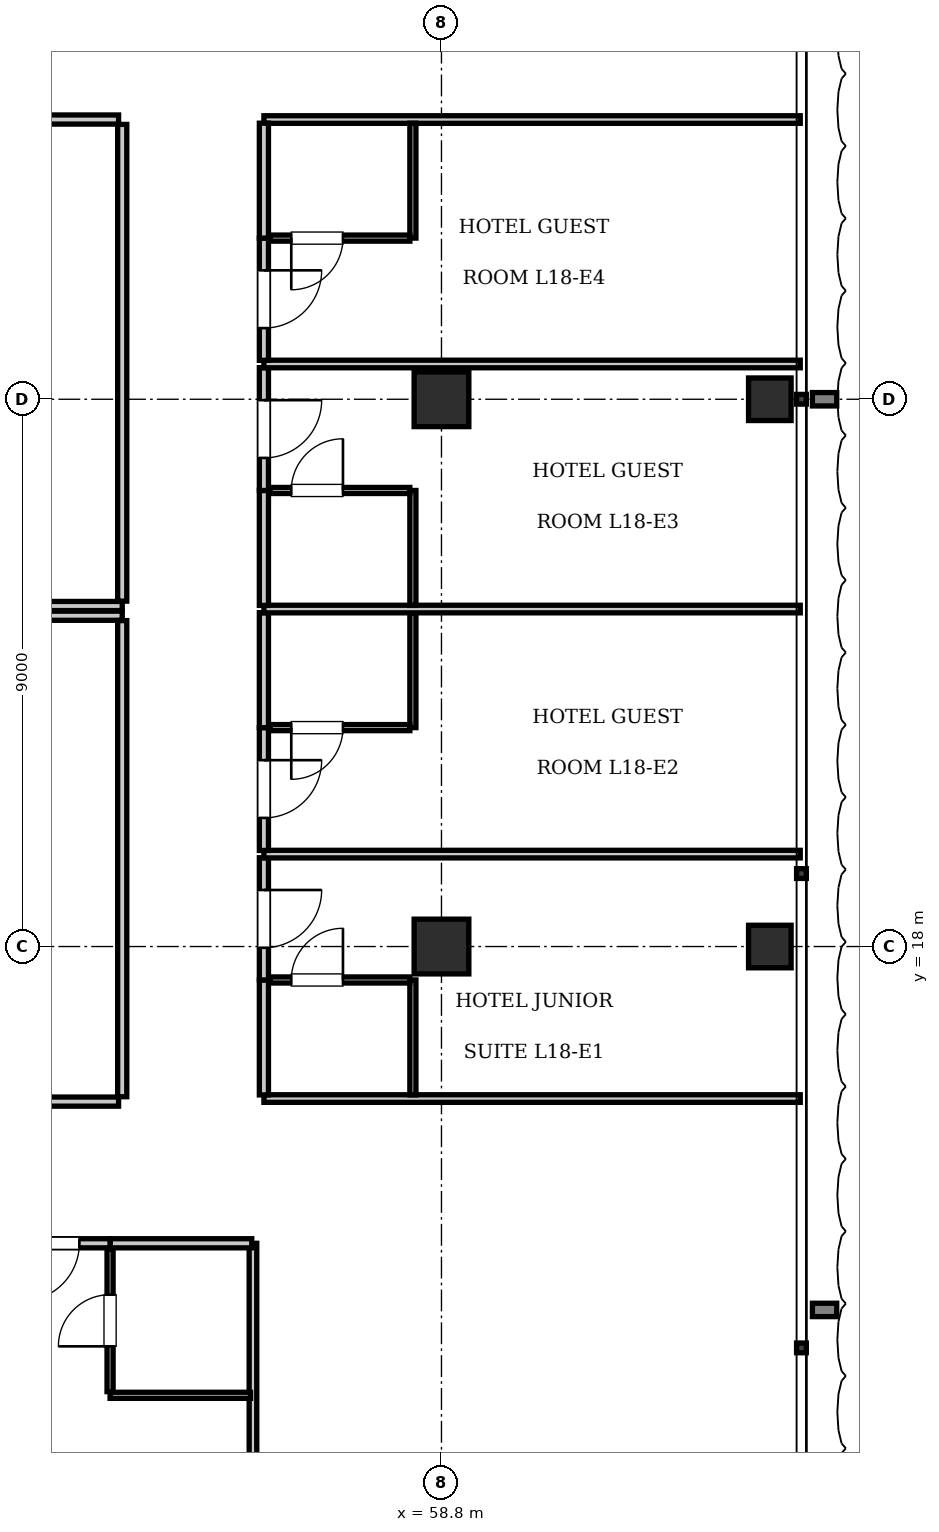
"""IFC4 building model, lengths in metres.
Left out: names, types, materials, properties, quantities, classifications, styles, units other than length and angle.
Written with IfcOpenShell. Run it as: python <this file> out.ifc"""

import sys

from ifc_helpers import new_model, si_unit, direction, frame, frame_2d, origin, origin_2d, place, context, subcontext, project, spatial, rectangle, i_section, extrude, element, fill, save


model = new_model("IFC4")
c1 = context("Model", 3, precision=1e-05, world=origin(), true_north=direction((0.0, 1.0)))
c2 = subcontext(c1, "Body", "Model", "MODEL_VIEW")
j1 = project(units=[si_unit("LENGTHUNIT", "METRE"), si_unit("PLANEANGLEUNIT", "RADIAN")], contexts=[c1])
p1 = place(None, origin())
s1 = spatial("IfcSite", under=j1, at=p1, CompositionType="ELEMENT")
p2 = place(p1, origin())
s2 = spatial("IfcBuilding", under=s1, at=p2, CompositionType="ELEMENT")
p3 = place(p2, frame((0.0, 0.0, 77.0)))
s3 = spatial("IfcBuildingStorey", under=s2, at=p3, CompositionType="ELEMENT", Elevation=77.0)
for number, where, z_axis, x_axis in (
    (1, (58.8, 18.0, 0.0), (0.0, 0.0, 1.0), (1.0, 0.0, 0.0)),
    (2, (58.8, 27.0, 0.0), (0.0, 0.0, 1.0), (1.0, 0.0, 0.0)),
):
    element("IfcColumn", number, at=place(p3, frame(where, z_axis=z_axis, x_axis=x_axis)), inside=s3, PredefinedType="COLUMN", context=c2, shape_type="SweptSolid", body=[
        extrude(rectangle(XDim=0.9, YDim=0.9, at=origin_2d()), origin(), (0.0, 0.0, 1.0), 3.85),
    ])
for number, where, z_axis, x_axis in (
    (3, (64.2, 18.0, 0.0), (0.0, 0.0, 1.0), (1.0, 0.0, 0.0)),
    (4, (64.2, 27.0, 0.0), (0.0, 0.0, 1.0), (1.0, 0.0, 0.0)),
):
    element("IfcColumn", number, at=place(p3, frame(where, z_axis=z_axis, x_axis=x_axis)), inside=s3, PredefinedType="COLUMN", context=c2, shape_type="SweptSolid", body=[
        extrude(i_section(OverallWidth=0.7, OverallDepth=0.7, WebThickness=0.028, FlangeThickness=0.044, at=origin_2d()), origin(), (0.0, 0.0, 1.0), 3.85),
    ])
p4 = place(p3, frame((22.05, 23.6, 0.0), z_axis=(0.0, 0.0, 1.0), x_axis=(1.0, 0.0, 0.0)))
e5 = element("IfcWall", 5, at=p4, inside=s3, PredefinedType="PARTITIONING", context=c2, shape_type="SweptSolid", body=[
    extrude(rectangle(XDim=31.5, YDim=0.15, at=frame_2d((15.75, 0.0))), origin(), (0.0, 0.0, 1.0), 3.61),
])
p5 = place(p3, frame((53.55, 23.68, 0.0), z_axis=(0.0, 0.0, 1.0), x_axis=(0.0, 1.0, 0.0)))
e6 = element("IfcWall", 6, at=p5, inside=s3, PredefinedType="PARTITIONING", context=c2, shape_type="SweptSolid", body=[
    extrude(rectangle(XDim=7.84, YDim=0.15, at=frame_2d((3.92, 0.0))), origin(), (0.0, 0.0, 1.0), 3.61),
])
p6 = place(p3, frame((42.87, 31.6, 0.0), z_axis=(0.0, 0.0, 1.0), x_axis=(1.0, 0.0, 0.0)))
e7 = element("IfcWall", 7, at=p6, inside=s3, PredefinedType="PARTITIONING", context=c2, shape_type="SweptSolid", body=[
    extrude(rectangle(XDim=10.62, YDim=0.15, at=frame_2d((5.31, 0.0))), origin(), (0.0, 0.0, 1.0), 3.61),
])
p7 = place(p6, frame((4.86, 0.0, 0.0)))
e8 = element("IfcOpeningElement", 8, at=p7, cuts=e7, PredefinedType="OPENING", context=c2, shape_type="SweptSolid", body=[
    extrude(rectangle(XDim=0.9, YDim=2.1, at=frame_2d((0.45, 1.05))), frame((0.0, 0.085, 0.0), z_axis=(0.0, -1.0, 0.0), x_axis=(1.0, 0.0, 0.0)), (0.0, 0.0, 1.0), 0.17),
])
p8 = place(p3, frame((22.05, 23.44, 0.0), z_axis=(0.0, 0.0, 1.0), x_axis=(1.0, 0.0, 0.0)))
e9 = element("IfcWall", 9, at=p8, inside=s3, PredefinedType="PARTITIONING", context=c2, shape_type="SweptSolid", body=[
    extrude(rectangle(XDim=31.5, YDim=0.15, at=frame_2d((15.75, 0.0))), origin(), (0.0, 0.0, 1.0), 3.61),
])
p9 = place(p3, frame((53.55, 15.53, 0.0), z_axis=(0.0, 0.0, 1.0), x_axis=(0.0, 1.0, 0.0)))
e10 = element("IfcWall", 10, at=p9, inside=s3, PredefinedType="PARTITIONING", context=c2, shape_type="SweptSolid", body=[
    extrude(rectangle(XDim=7.83, YDim=0.15, at=frame_2d((3.915, 0.0))), origin(), (0.0, 0.0, 1.0), 3.61),
])
p10 = place(p3, frame((40.035, 15.45, 0.0), z_axis=(0.0, 0.0, 1.0), x_axis=(1.0, 0.0, 0.0)))
e11 = element("IfcWall", 11, at=p10, inside=s3, PredefinedType="PARTITIONING", context=c2, shape_type="SweptSolid", body=[
    extrude(rectangle(XDim=13.455, YDim=0.15, at=frame_2d((6.728, 0.0))), origin(), (0.0, 0.0, 1.0), 3.61),
])
p11 = place(p10, frame((6.278, 0.0, 0.0)))
e12 = element("IfcOpeningElement", 12, at=p11, cuts=e11, PredefinedType="OPENING", context=c2, shape_type="SweptSolid", body=[
    extrude(rectangle(XDim=0.9, YDim=2.1, at=frame_2d((0.45, 1.05))), frame((0.0, 0.085, 0.0), z_axis=(0.0, -1.0, 0.0), x_axis=(1.0, 0.0, 0.0)), (0.0, 0.0, 1.0), 0.17),
])
p12 = place(p3, frame((55.7, 0.1, 0.0), z_axis=(0.0, 0.0, 1.0), x_axis=(0.0, 1.0, 0.0)))
e13 = element("IfcWall", 13, at=p12, inside=s3, PredefinedType="PARTITIONING", context=c2, shape_type="SweptSolid", body=[
    extrude(rectangle(XDim=13.02, YDim=0.125, at=frame_2d((6.51, 0.0))), origin(), (0.0, 0.0, 1.0), 3.61),
])
p13 = place(p3, frame((53.35, 13.12, 0.0), z_axis=(0.0, 0.0, 1.0), x_axis=(1.0, 0.0, 0.0)))
e14 = element("IfcWall", 14, at=p13, inside=s3, PredefinedType="PARTITIONING", context=c2, shape_type="SweptSolid", body=[
    extrude(rectangle(XDim=2.33, YDim=0.15, at=frame_2d((1.165, 0.0))), origin(), (0.0, 0.0, 1.0), 3.61),
])
p14 = place(p3, frame((53.35, 10.62, 0.0), z_axis=(0.0, 0.0, 1.0), x_axis=(1.0, 0.0, 0.0)))
e15 = element("IfcWall", 15, at=p14, inside=s3, PredefinedType="PARTITIONING", context=c2, shape_type="SweptSolid", body=[
    extrude(rectangle(XDim=2.31, YDim=0.1, at=frame_2d((1.155, 0.0))), origin(), (0.0, 0.0, 1.0), 3.61),
])
p15 = place(p3, frame((53.35, 10.68, 0.0), z_axis=(0.0, 0.0, 1.0), x_axis=(0.0, 1.0, 0.0)))
e16 = element("IfcWall", 16, at=p15, inside=s3, PredefinedType="PARTITIONING", context=c2, shape_type="SweptSolid", body=[
    extrude(rectangle(XDim=2.34, YDim=0.1, at=frame_2d((1.17, 0.0))), origin(), (0.0, 0.0, 1.0), 3.61),
])
p16 = place(p15, frame((0.745, 0.0, 0.0)))
e17 = element("IfcOpeningElement", 17, at=p16, cuts=e16, PredefinedType="OPENING", context=c2, shape_type="SweptSolid", body=[
    extrude(rectangle(XDim=0.85, YDim=2.1, at=frame_2d((0.425, 1.05))), frame((0.0, 0.06, 0.0), z_axis=(0.0, -1.0, 0.0), x_axis=(1.0, 0.0, 0.0)), (0.0, 0.0, 1.0), 0.12),
])
p17 = place(p3, frame((51.39, 13.12, 0.0), z_axis=(0.0, 0.0, 1.0), x_axis=(1.0, 0.0, 0.0)))
e18 = element("IfcWall", 18, at=p17, inside=s3, PredefinedType="PARTITIONING", context=c2, shape_type="SweptSolid", body=[
    extrude(rectangle(XDim=1.96, YDim=0.15, at=frame_2d((0.98, 0.0))), origin(), (0.0, 0.0, 1.0), 3.61),
])
p18 = place(p17, frame((0.505, 0.0, 0.0)))
e19 = element("IfcOpeningElement", 19, at=p18, cuts=e18, PredefinedType="OPENING", context=c2, shape_type="SweptSolid", body=[
    extrude(rectangle(XDim=0.95, YDim=2.15, at=frame_2d((0.475, 1.075))), frame((0.0, 0.085, 0.0), z_axis=(0.0, -1.0, 0.0), x_axis=(1.0, 0.0, 0.0)), (0.0, 0.0, 1.0), 0.17),
])
for number, where, z_axis, x_axis in (
    (20, (55.88, 15.5, 0.0), (0.0, 0.0, 1.0), (1.0, 0.0, 0.0)),
    (21, (55.88, 31.6, 0.0), (0.0, 0.0, 1.0), (1.0, 0.0, 0.0)),
):
    element("IfcWall", number, at=place(p3, frame(where, z_axis=z_axis, x_axis=x_axis)), inside=s3, PredefinedType="PARTITIONING", context=c2, shape_type="SweptSolid", body=[
        extrude(rectangle(XDim=8.82, YDim=0.125, at=frame_2d((4.41, 0.0))), origin(), (0.0, 0.0, 1.0), 3.61),
    ])
p19 = place(p3, frame((55.88, 15.56, 0.0), z_axis=(0.0, 0.0, 1.0), x_axis=(0.0, 1.0, 0.0)))
e22 = element("IfcWall", 22, at=p19, inside=s3, PredefinedType="PARTITIONING", context=c2, shape_type="SweptSolid", body=[
    extrude(rectangle(XDim=1.89, YDim=0.15, at=frame_2d((0.945, 0.0))), origin(), (0.0, 0.0, 1.0), 3.61),
])
p20 = place(p3, frame((55.88, 17.45, 0.0), z_axis=(0.0, 0.0, 1.0), x_axis=(0.0, 1.0, 0.0)))
e23 = element("IfcWall", 23, at=p20, inside=s3, PredefinedType="PARTITIONING", context=c2, shape_type="SweptSolid", body=[
    extrude(rectangle(XDim=2.01, YDim=0.15, at=frame_2d((1.005, 0.0))), origin(), (0.0, 0.0, 1.0), 3.61),
])
p21 = place(p20, frame((0.53, 0.0, 0.0)))
e24 = element("IfcOpeningElement", 24, at=p21, cuts=e23, PredefinedType="OPENING", context=c2, shape_type="SweptSolid", body=[
    extrude(rectangle(XDim=0.95, YDim=2.15, at=frame_2d((0.475, 1.075))), frame((0.0, 0.085, 0.0), z_axis=(0.0, -1.0, 0.0), x_axis=(1.0, 0.0, 0.0)), (0.0, 0.0, 1.0), 0.17),
])
p22 = place(p3, frame((58.33, 15.56, 0.0), z_axis=(0.0, 0.0, 1.0), x_axis=(0.0, 1.0, 0.0)))
e25 = element("IfcWall", 25, at=p22, inside=s3, PredefinedType="PARTITIONING", context=c2, shape_type="SweptSolid", body=[
    extrude(rectangle(XDim=1.89, YDim=0.1, at=frame_2d((0.945, 0.0))), origin(), (0.0, 0.0, 1.0), 3.61),
])
p23 = place(p3, frame((55.98, 17.45, 0.0), z_axis=(0.0, 0.0, 1.0), x_axis=(1.0, 0.0, 0.0)))
e26 = element("IfcWall", 26, at=p23, inside=s3, PredefinedType="PARTITIONING", context=c2, shape_type="SweptSolid", body=[
    extrude(rectangle(XDim=2.3, YDim=0.1, at=frame_2d((1.15, 0.0))), origin(), (0.0, 0.0, 1.0), 3.61),
])
p24 = place(p23, frame((0.35, 0.0, 0.0)))
e27 = element("IfcOpeningElement", 27, at=p24, cuts=e26, PredefinedType="OPENING", context=c2, shape_type="SweptSolid", body=[
    extrude(rectangle(XDim=0.85, YDim=2.1, at=frame_2d((0.425, 1.05))), frame((0.0, 0.06, 0.0), z_axis=(0.0, -1.0, 0.0), x_axis=(1.0, 0.0, 0.0)), (0.0, 0.0, 1.0), 0.12),
])
p25 = place(p3, frame((55.88, 19.52, 0.0), z_axis=(0.0, 0.0, 1.0), x_axis=(1.0, 0.0, 0.0)))
e28 = element("IfcWall", 28, at=p25, inside=s3, PredefinedType="PARTITIONING", context=c2, shape_type="SweptSolid", body=[
    extrude(rectangle(XDim=8.82, YDim=0.125, at=frame_2d((4.41, 0.0))), origin(), (0.0, 0.0, 1.0), 3.61),
])
p26 = place(p3, frame((55.88, 19.58, 0.0), z_axis=(0.0, 0.0, 1.0), x_axis=(0.0, 1.0, 0.0)))
e29 = element("IfcWall", 29, at=p26, inside=s3, PredefinedType="PARTITIONING", context=c2, shape_type="SweptSolid", body=[
    extrude(rectangle(XDim=2.02, YDim=0.15, at=frame_2d((1.01, 0.0))), origin(), (0.0, 0.0, 1.0), 3.61),
])
p27 = place(p26, frame((0.535, 0.0, 0.0)))
e30 = element("IfcOpeningElement", 30, at=p27, cuts=e29, PredefinedType="OPENING", context=c2, shape_type="SweptSolid", body=[
    extrude(rectangle(XDim=0.95, YDim=2.15, at=frame_2d((0.475, 1.075))), frame((0.0, 0.085, 0.0), z_axis=(0.0, -1.0, 0.0), x_axis=(1.0, 0.0, 0.0)), (0.0, 0.0, 1.0), 0.17),
])
p28 = place(p3, frame((55.88, 21.6, 0.0), z_axis=(0.0, 0.0, 1.0), x_axis=(0.0, 1.0, 0.0)))
e31 = element("IfcWall", 31, at=p28, inside=s3, PredefinedType="PARTITIONING", context=c2, shape_type="SweptSolid", body=[
    extrude(rectangle(XDim=1.89, YDim=0.15, at=frame_2d((0.945, 0.0))), origin(), (0.0, 0.0, 1.0), 3.61),
])
p29 = place(p3, frame((58.33, 21.6, 0.0), z_axis=(0.0, 0.0, 1.0), x_axis=(0.0, 1.0, 0.0)))
e32 = element("IfcWall", 32, at=p29, inside=s3, PredefinedType="PARTITIONING", context=c2, shape_type="SweptSolid", body=[
    extrude(rectangle(XDim=1.89, YDim=0.1, at=frame_2d((0.945, 0.0))), origin(), (0.0, 0.0, 1.0), 3.61),
])
p30 = place(p3, frame((55.98, 21.6, 0.0), z_axis=(0.0, 0.0, 1.0), x_axis=(1.0, 0.0, 0.0)))
e33 = element("IfcWall", 33, at=p30, inside=s3, PredefinedType="PARTITIONING", context=c2, shape_type="SweptSolid", body=[
    extrude(rectangle(XDim=2.3, YDim=0.1, at=frame_2d((1.15, 0.0))), origin(), (0.0, 0.0, 1.0), 3.61),
])
p31 = place(p30, frame((0.35, 0.0, 0.0)))
e34 = element("IfcOpeningElement", 34, at=p31, cuts=e33, PredefinedType="OPENING", context=c2, shape_type="SweptSolid", body=[
    extrude(rectangle(XDim=0.85, YDim=2.1, at=frame_2d((0.425, 1.05))), frame((0.0, 0.06, 0.0), z_axis=(0.0, -1.0, 0.0), x_axis=(1.0, 0.0, 0.0)), (0.0, 0.0, 1.0), 0.12),
])
p32 = place(p3, frame((55.88, 23.55, 0.0), z_axis=(0.0, 0.0, 1.0), x_axis=(1.0, 0.0, 0.0)))
e35 = element("IfcWall", 35, at=p32, inside=s3, PredefinedType="PARTITIONING", context=c2, shape_type="SweptSolid", body=[
    extrude(rectangle(XDim=8.82, YDim=0.125, at=frame_2d((4.41, 0.0))), origin(), (0.0, 0.0, 1.0), 3.61),
])
p33 = place(p3, frame((55.88, 23.61, 0.0), z_axis=(0.0, 0.0, 1.0), x_axis=(0.0, 1.0, 0.0)))
e36 = element("IfcWall", 36, at=p33, inside=s3, PredefinedType="PARTITIONING", context=c2, shape_type="SweptSolid", body=[
    extrude(rectangle(XDim=1.89, YDim=0.15, at=frame_2d((0.945, 0.0))), origin(), (0.0, 0.0, 1.0), 3.61),
])
p34 = place(p3, frame((55.88, 25.5, 0.0), z_axis=(0.0, 0.0, 1.0), x_axis=(0.0, 1.0, 0.0)))
e37 = element("IfcWall", 37, at=p34, inside=s3, PredefinedType="PARTITIONING", context=c2, shape_type="SweptSolid", body=[
    extrude(rectangle(XDim=2.02, YDim=0.15, at=frame_2d((1.01, 0.0))), origin(), (0.0, 0.0, 1.0), 3.61),
])
p35 = place(p34, frame((0.535, 0.0, 0.0)))
e38 = element("IfcOpeningElement", 38, at=p35, cuts=e37, PredefinedType="OPENING", context=c2, shape_type="SweptSolid", body=[
    extrude(rectangle(XDim=0.95, YDim=2.15, at=frame_2d((0.475, 1.075))), frame((0.0, 0.085, 0.0), z_axis=(0.0, -1.0, 0.0), x_axis=(1.0, 0.0, 0.0)), (0.0, 0.0, 1.0), 0.17),
])
p36 = place(p3, frame((58.33, 23.61, 0.0), z_axis=(0.0, 0.0, 1.0), x_axis=(0.0, 1.0, 0.0)))
e39 = element("IfcWall", 39, at=p36, inside=s3, PredefinedType="PARTITIONING", context=c2, shape_type="SweptSolid", body=[
    extrude(rectangle(XDim=1.89, YDim=0.1, at=frame_2d((0.945, 0.0))), origin(), (0.0, 0.0, 1.0), 3.61),
])
p37 = place(p3, frame((55.98, 25.5, 0.0), z_axis=(0.0, 0.0, 1.0), x_axis=(1.0, 0.0, 0.0)))
e40 = element("IfcWall", 40, at=p37, inside=s3, PredefinedType="PARTITIONING", context=c2, shape_type="SweptSolid", body=[
    extrude(rectangle(XDim=2.3, YDim=0.1, at=frame_2d((1.15, 0.0))), origin(), (0.0, 0.0, 1.0), 3.61),
])
p38 = place(p37, frame((0.35, 0.0, 0.0)))
e41 = element("IfcOpeningElement", 41, at=p38, cuts=e40, PredefinedType="OPENING", context=c2, shape_type="SweptSolid", body=[
    extrude(rectangle(XDim=0.85, YDim=2.1, at=frame_2d((0.425, 1.05))), frame((0.0, 0.06, 0.0), z_axis=(0.0, -1.0, 0.0), x_axis=(1.0, 0.0, 0.0)), (0.0, 0.0, 1.0), 0.12),
])
p39 = place(p3, frame((55.88, 27.58, 0.0), z_axis=(0.0, 0.0, 1.0), x_axis=(1.0, 0.0, 0.0)))
e42 = element("IfcWall", 42, at=p39, inside=s3, PredefinedType="PARTITIONING", context=c2, shape_type="SweptSolid", body=[
    extrude(rectangle(XDim=8.82, YDim=0.125, at=frame_2d((4.41, 0.0))), origin(), (0.0, 0.0, 1.0), 3.61),
])
p40 = place(p3, frame((55.88, 27.64, 0.0), z_axis=(0.0, 0.0, 1.0), x_axis=(0.0, 1.0, 0.0)))
e43 = element("IfcWall", 43, at=p40, inside=s3, PredefinedType="PARTITIONING", context=c2, shape_type="SweptSolid", body=[
    extrude(rectangle(XDim=2.01, YDim=0.15, at=frame_2d((1.005, 0.0))), origin(), (0.0, 0.0, 1.0), 3.61),
])
p41 = place(p40, frame((0.53, 0.0, 0.0)))
e44 = element("IfcOpeningElement", 44, at=p41, cuts=e43, PredefinedType="OPENING", context=c2, shape_type="SweptSolid", body=[
    extrude(rectangle(XDim=0.95, YDim=2.15, at=frame_2d((0.475, 1.075))), frame((0.0, 0.085, 0.0), z_axis=(0.0, -1.0, 0.0), x_axis=(1.0, 0.0, 0.0)), (0.0, 0.0, 1.0), 0.17),
])
p42 = place(p3, frame((55.88, 29.65, 0.0), z_axis=(0.0, 0.0, 1.0), x_axis=(0.0, 1.0, 0.0)))
e45 = element("IfcWall", 45, at=p42, inside=s3, PredefinedType="PARTITIONING", context=c2, shape_type="SweptSolid", body=[
    extrude(rectangle(XDim=1.89, YDim=0.15, at=frame_2d((0.945, 0.0))), origin(), (0.0, 0.0, 1.0), 3.61),
])
p43 = place(p3, frame((58.33, 29.65, 0.0), z_axis=(0.0, 0.0, 1.0), x_axis=(0.0, 1.0, 0.0)))
e46 = element("IfcWall", 46, at=p43, inside=s3, PredefinedType="PARTITIONING", context=c2, shape_type="SweptSolid", body=[
    extrude(rectangle(XDim=1.89, YDim=0.1, at=frame_2d((0.945, 0.0))), origin(), (0.0, 0.0, 1.0), 3.61),
])
p44 = place(p3, frame((55.98, 29.65, 0.0), z_axis=(0.0, 0.0, 1.0), x_axis=(1.0, 0.0, 0.0)))
e47 = element("IfcWall", 47, at=p44, inside=s3, PredefinedType="PARTITIONING", context=c2, shape_type="SweptSolid", body=[
    extrude(rectangle(XDim=2.3, YDim=0.1, at=frame_2d((1.15, 0.0))), origin(), (0.0, 0.0, 1.0), 3.61),
])
p45 = place(p44, frame((0.35, 0.0, 0.0)))
e48 = element("IfcOpeningElement", 48, at=p45, cuts=e47, PredefinedType="OPENING", context=c2, shape_type="SweptSolid", body=[
    extrude(rectangle(XDim=0.85, YDim=2.1, at=frame_2d((0.425, 1.05))), frame((0.0, 0.06, 0.0), z_axis=(0.0, -1.0, 0.0), x_axis=(1.0, 0.0, 0.0)), (0.0, 0.0, 1.0), 0.12),
])
p46 = place(p16, origin())
e49 = element("IfcDoor", 49, at=p46, inside=s3, OperationType="SINGLE_SWING_LEFT", PredefinedType="DOOR", context=c2, shape_type="SweptSolid", body=[
    extrude(rectangle(XDim=0.85, YDim=2.1, at=frame_2d((0.425, 1.05))), frame((0.0, 0.025, 0.0), z_axis=(0.0, -1.0, 0.0), x_axis=(1.0, 0.0, 0.0)), (0.0, 0.0, 1.0), 0.05),
])
fill(e17, e49)
p47 = place(p18, frame((0.95, 0.0, 0.0), z_axis=(0.0, 0.0, 1.0), x_axis=(-1.0, 0.0, 0.0)))
e50 = element("IfcDoor", 50, at=p47, inside=s3, OperationType="SINGLE_SWING_RIGHT", PredefinedType="DOOR", context=c2, shape_type="SweptSolid", body=[
    extrude(rectangle(XDim=0.95, YDim=2.15, at=frame_2d((0.475, 1.075))), frame((0.0, 0.025, 0.0), z_axis=(0.0, -1.0, 0.0), x_axis=(1.0, 0.0, 0.0)), (0.0, 0.0, 1.0), 0.05),
])
fill(e19, e50)
p48 = place(p24, origin())
e51 = element("IfcDoor", 51, at=p48, inside=s3, OperationType="SINGLE_SWING_RIGHT", PredefinedType="DOOR", context=c2, shape_type="SweptSolid", body=[
    extrude(rectangle(XDim=0.85, YDim=2.1, at=frame_2d((0.425, 1.05))), frame((0.0, 0.025, 0.0), z_axis=(0.0, -1.0, 0.0), x_axis=(1.0, 0.0, 0.0)), (0.0, 0.0, 1.0), 0.05),
])
fill(e27, e51)
p49 = place(p21, frame((0.95, 0.0, 0.0), z_axis=(0.0, 0.0, 1.0), x_axis=(-1.0, 0.0, 0.0)))
e52 = element("IfcDoor", 52, at=p49, inside=s3, OperationType="SINGLE_SWING_LEFT", PredefinedType="DOOR", context=c2, shape_type="SweptSolid", body=[
    extrude(rectangle(XDim=0.95, YDim=2.15, at=frame_2d((0.475, 1.075))), frame((0.0, 0.025, 0.0), z_axis=(0.0, -1.0, 0.0), x_axis=(1.0, 0.0, 0.0)), (0.0, 0.0, 1.0), 0.05),
])
fill(e24, e52)
p50 = place(p31, frame((0.85, 0.0, 0.0), z_axis=(0.0, 0.0, 1.0), x_axis=(-1.0, 0.0, 0.0)))
e53 = element("IfcDoor", 53, at=p50, inside=s3, OperationType="SINGLE_SWING_RIGHT", PredefinedType="DOOR", context=c2, shape_type="SweptSolid", body=[
    extrude(rectangle(XDim=0.85, YDim=2.1, at=frame_2d((0.425, 1.05))), frame((0.0, 0.025, 0.0), z_axis=(0.0, -1.0, 0.0), x_axis=(1.0, 0.0, 0.0)), (0.0, 0.0, 1.0), 0.05),
])
fill(e34, e53)
p51 = place(p27, frame((0.95, 0.0, 0.0), z_axis=(0.0, 0.0, 1.0), x_axis=(-1.0, 0.0, 0.0)))
e54 = element("IfcDoor", 54, at=p51, inside=s3, OperationType="SINGLE_SWING_LEFT", PredefinedType="DOOR", context=c2, shape_type="SweptSolid", body=[
    extrude(rectangle(XDim=0.95, YDim=2.15, at=frame_2d((0.475, 1.075))), frame((0.0, 0.025, 0.0), z_axis=(0.0, -1.0, 0.0), x_axis=(1.0, 0.0, 0.0)), (0.0, 0.0, 1.0), 0.05),
])
fill(e30, e54)
p52 = place(p38, origin())
e55 = element("IfcDoor", 55, at=p52, inside=s3, OperationType="SINGLE_SWING_RIGHT", PredefinedType="DOOR", context=c2, shape_type="SweptSolid", body=[
    extrude(rectangle(XDim=0.85, YDim=2.1, at=frame_2d((0.425, 1.05))), frame((0.0, 0.025, 0.0), z_axis=(0.0, -1.0, 0.0), x_axis=(1.0, 0.0, 0.0)), (0.0, 0.0, 1.0), 0.05),
])
fill(e41, e55)
p53 = place(p35, frame((0.95, 0.0, 0.0), z_axis=(0.0, 0.0, 1.0), x_axis=(-1.0, 0.0, 0.0)))
e56 = element("IfcDoor", 56, at=p53, inside=s3, OperationType="SINGLE_SWING_LEFT", PredefinedType="DOOR", context=c2, shape_type="SweptSolid", body=[
    extrude(rectangle(XDim=0.95, YDim=2.15, at=frame_2d((0.475, 1.075))), frame((0.0, 0.025, 0.0), z_axis=(0.0, -1.0, 0.0), x_axis=(1.0, 0.0, 0.0)), (0.0, 0.0, 1.0), 0.05),
])
fill(e38, e56)
p54 = place(p45, frame((0.85, 0.0, 0.0), z_axis=(0.0, 0.0, 1.0), x_axis=(-1.0, 0.0, 0.0)))
e57 = element("IfcDoor", 57, at=p54, inside=s3, OperationType="SINGLE_SWING_RIGHT", PredefinedType="DOOR", context=c2, shape_type="SweptSolid", body=[
    extrude(rectangle(XDim=0.85, YDim=2.1, at=frame_2d((0.425, 1.05))), frame((0.0, 0.025, 0.0), z_axis=(0.0, -1.0, 0.0), x_axis=(1.0, 0.0, 0.0)), (0.0, 0.0, 1.0), 0.05),
])
fill(e48, e57)
p55 = place(p41, frame((0.95, 0.0, 0.0), z_axis=(0.0, 0.0, 1.0), x_axis=(-1.0, 0.0, 0.0)))
e58 = element("IfcDoor", 58, at=p55, inside=s3, OperationType="SINGLE_SWING_LEFT", PredefinedType="DOOR", context=c2, shape_type="SweptSolid", body=[
    extrude(rectangle(XDim=0.95, YDim=2.15, at=frame_2d((0.475, 1.075))), frame((0.0, 0.025, 0.0), z_axis=(0.0, -1.0, 0.0), x_axis=(1.0, 0.0, 0.0)), (0.0, 0.0, 1.0), 0.05),
])
fill(e44, e58)
save(model, sys.argv[1])
